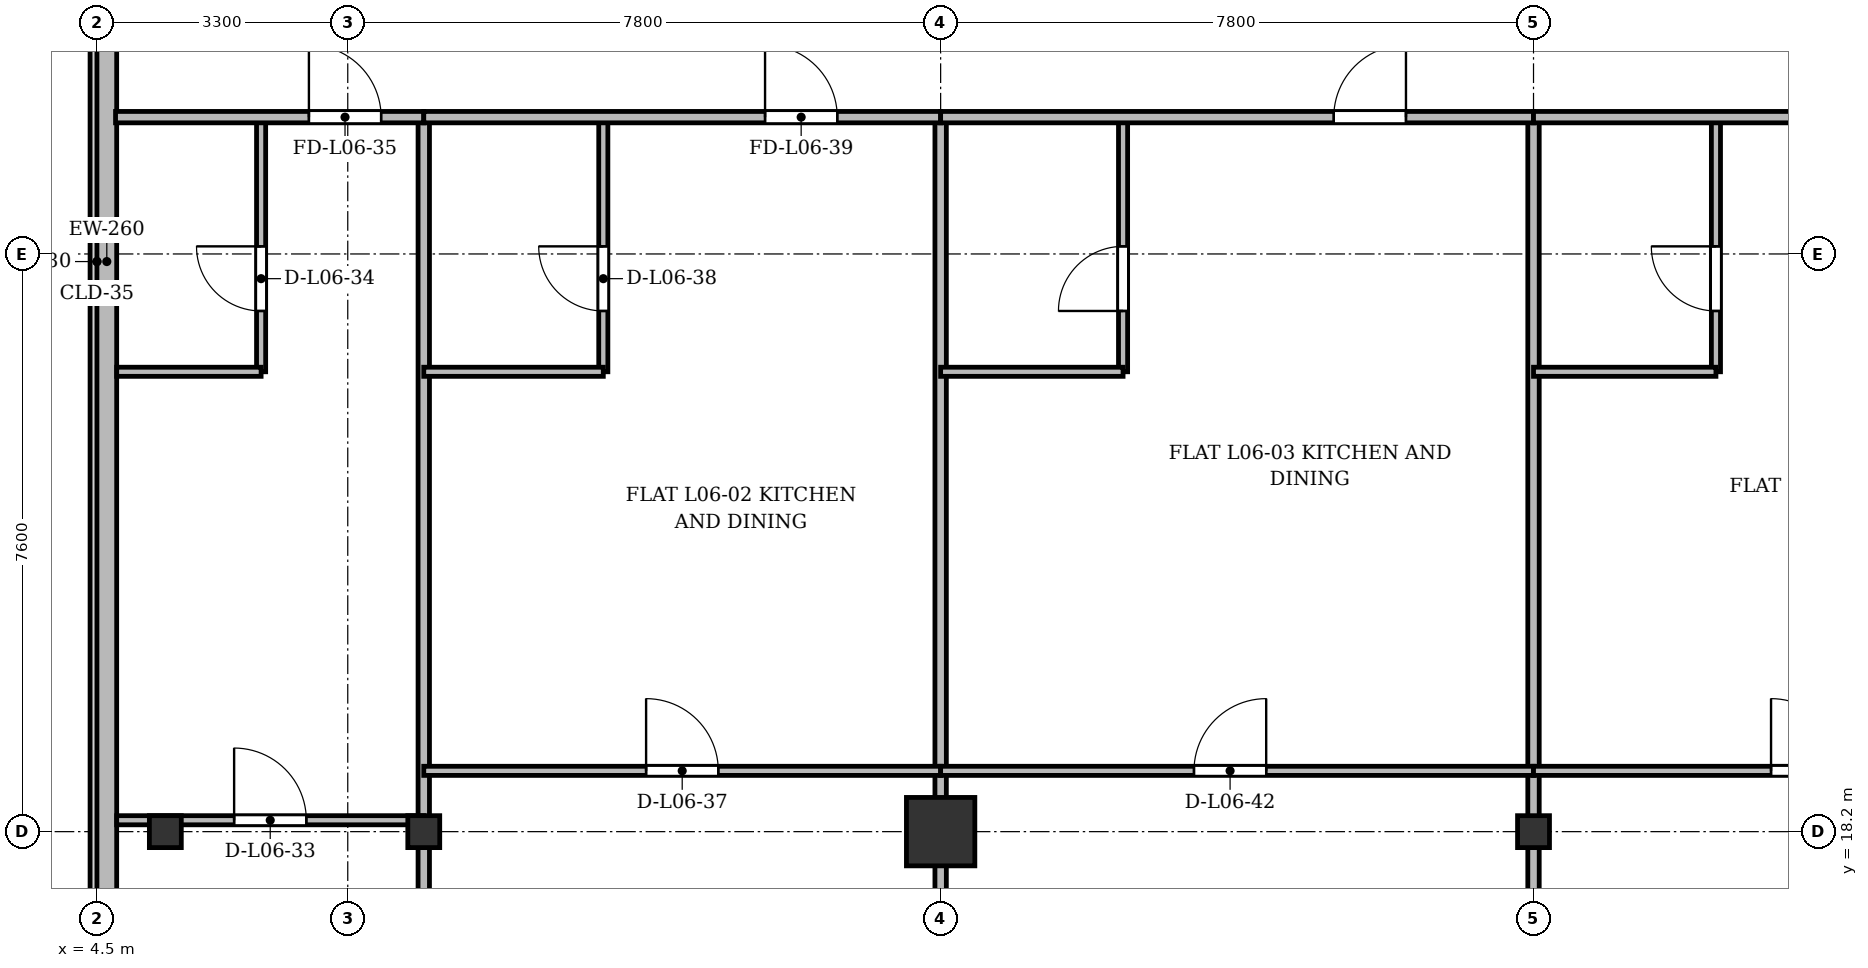
"""IFC4 building model, lengths in metres.
Left out: names, types, materials, properties, quantities, classifications, styles, units other than length and angle.
Written with IfcOpenShell. Run it as: python <this file> out.ifc"""

import sys

from ifc_helpers import new_model, si_unit, direction, frame, frame_2d, origin, origin_2d, place, context, subcontext, project, spatial, rectangle, i_section, extrude, source, transform, mapped, element, fill, save


model = new_model("IFC4")
c1 = context("Model", 3, precision=1e-05, world=origin(), true_north=direction((0.0, 1.0)))
c2 = subcontext(c1, "Body", "Model", "MODEL_VIEW")
j1 = project(units=[si_unit("LENGTHUNIT", "METRE"), si_unit("PLANEANGLEUNIT", "RADIAN")], contexts=[c1])
p1 = place(None, origin())
s1 = spatial("IfcSite", under=j1, at=p1, CompositionType="ELEMENT")
p2 = place(p1, origin())
s2 = spatial("IfcBuilding", under=s1, at=p2, CompositionType="ELEMENT")
p3 = place(p2, frame((0.0, 0.0, 27.1)))
s3 = spatial("IfcBuildingStorey", under=s2, at=p3, CompositionType="ELEMENT", Elevation=27.1)
m1 = source(origin(), c2, "Body", "SweptSolid", [
    extrude(i_section(OverallWidth=0.42, OverallDepth=0.42, WebThickness=0.026, FlangeThickness=0.04, at=origin_2d()), origin(), (0.0, 0.0, 1.0), 3.6),
])
for number, where, z_axis, x_axis in (
    (1, (5.4, 18.2, 0.0), (0.0, 0.0, 1.0), (1.0, 0.0, 0.0)),
    (2, (8.8, 18.2, 0.0), (0.0, 0.0, 1.0), (1.0, 0.0, 0.0)),
):
    element("IfcColumn", number, at=place(p3, frame(where, z_axis=z_axis, x_axis=x_axis)), inside=s3, PredefinedType="COLUMN", context=c2, shape_type="MappedRepresentation", body=[
        mapped(m1, transform((0.0, 0.0, 0.0), x_axis=(1.0, 0.0, 0.0), y_axis=(0.0, 1.0, 0.0), z_axis=(0.0, 0.0, 1.0), scale=1.0)),
    ])
m2 = source(origin(), c2, "Body", "SweptSolid", [
    extrude(rectangle(XDim=0.9, YDim=0.9, at=origin_2d()), origin(), (0.0, 0.0, 1.0), 3.6),
])
p4 = place(p3, frame((15.6, 18.2, 0.0), z_axis=(0.0, 0.0, 1.0), x_axis=(1.0, 0.0, 0.0)))
e3 = element("IfcColumn", 3, at=p4, inside=s3, PredefinedType="COLUMN", context=c2, shape_type="MappedRepresentation", body=[
    mapped(m2, transform((0.0, 0.0, 0.0), x_axis=(1.0, 0.0, 0.0), y_axis=(0.0, 1.0, 0.0), z_axis=(0.0, 0.0, 1.0), scale=1.0)),
])
p5 = place(p3, frame((23.4, 18.2, 0.0), z_axis=(0.0, 0.0, 1.0), x_axis=(1.0, 0.0, 0.0)))
e4 = element("IfcColumn", 4, at=p5, inside=s3, PredefinedType="COLUMN", context=c2, shape_type="MappedRepresentation", body=[
    mapped(m1, transform((0.0, 0.0, 0.0), x_axis=(1.0, 0.0, 0.0), y_axis=(0.0, 1.0, 0.0), z_axis=(0.0, 0.0, 1.0), scale=1.0)),
])
p6 = place(p3, frame((4.63, 5.9, 0.0), z_axis=(0.0, 0.0, 1.0), x_axis=(0.0, 1.0, 0.0)))
e5 = element("IfcWall", 5, at=p6, inside=s3, PredefinedType="SOLIDWALL", context=c2, shape_type="SweptSolid", body=[
    extrude(rectangle(XDim=39.6, YDim=0.26, at=frame_2d((19.8, 0.0))), origin(), (0.0, 0.0, 1.0), 3.34),
])
p7 = place(p6, frame((1.45, 0.0, 0.92)))
e6 = element("IfcOpeningElement", 6, at=p7, cuts=e5, PredefinedType="OPENING", context=c2, shape_type="SweptSolid", body=[
    extrude(rectangle(XDim=1.2, YDim=1.65, at=frame_2d((0.6, 0.825))), frame((0.0, 0.14, 0.0), z_axis=(0.0, -1.0, 0.0), x_axis=(1.0, 0.0, 0.0)), (0.0, 0.0, 1.0), 0.28),
])
p8 = place(p6, frame((4.2, 0.0, 0.92)))
e7 = element("IfcOpeningElement", 7, at=p8, cuts=e5, PredefinedType="OPENING", context=c2, shape_type="SweptSolid", body=[
    extrude(rectangle(XDim=2.6, YDim=1.9, at=frame_2d((1.3, 0.95))), frame((0.0, 0.14, 0.0), z_axis=(0.0, -1.0, 0.0), x_axis=(1.0, 0.0, 0.0)), (0.0, 0.0, 1.0), 0.28),
])
p9 = place(p6, frame((8.4, 0.0, 0.92)))
e8 = element("IfcOpeningElement", 8, at=p9, cuts=e5, PredefinedType="OPENING", context=c2, shape_type="SweptSolid", body=[
    extrude(rectangle(XDim=2.6, YDim=1.9, at=frame_2d((1.3, 0.95))), frame((0.0, 0.14, 0.0), z_axis=(0.0, -1.0, 0.0), x_axis=(1.0, 0.0, 0.0)), (0.0, 0.0, 1.0), 0.28),
])
p10 = place(p6, frame((33.9, 0.0, 0.92)))
e9 = element("IfcOpeningElement", 9, at=p10, cuts=e5, PredefinedType="OPENING", context=c2, shape_type="SweptSolid", body=[
    extrude(rectangle(XDim=1.2, YDim=1.65, at=frame_2d((0.6, 0.825))), frame((0.0, 0.14, 0.0), z_axis=(0.0, -1.0, 0.0), x_axis=(1.0, 0.0, 0.0)), (0.0, 0.0, 1.0), 0.28),
])
p11 = place(p6, frame((37.25, 0.0, 0.92)))
e10 = element("IfcOpeningElement", 10, at=p11, cuts=e5, PredefinedType="OPENING", context=c2, shape_type="SweptSolid", body=[
    extrude(rectangle(XDim=1.2, YDim=1.65, at=frame_2d((0.6, 0.825))), frame((0.0, 0.14, 0.0), z_axis=(0.0, -1.0, 0.0), x_axis=(1.0, 0.0, 0.0)), (0.0, 0.0, 1.0), 0.28),
])
for number, where, z_axis, x_axis in (
    (11, (8.8, 3.145, 0.0), (0.0, 0.0, 1.0), (0.0, 1.0, 0.0)),
    (12, (15.6, 3.145, 0.0), (0.0, 0.0, 1.0), (0.0, 1.0, 0.0)),
    (13, (23.4, 3.145, 0.0), (0.0, 0.0, 1.0), (0.0, 1.0, 0.0)),
):
    element("IfcWall", number, at=place(p3, frame(where, z_axis=z_axis, x_axis=x_axis)), inside=s3, PredefinedType="PARTITIONING", context=c2, shape_type="SweptSolid", body=[
        extrude(rectangle(XDim=24.455, YDim=0.15, at=frame_2d((12.228, 0.0))), origin(), (0.0, 0.0, 1.0), 2.752),
    ])
p12 = place(p3, frame((4.76, 18.35, 0.0), z_axis=(0.0, 0.0, 1.0), x_axis=(1.0, 0.0, 0.0)))
e14 = element("IfcWall", 14, at=p12, inside=s3, PredefinedType="PARTITIONING", context=c2, shape_type="SweptSolid", body=[
    extrude(rectangle(XDim=4.04, YDim=0.12, at=frame_2d((2.02, 0.0))), origin(), (0.0, 0.0, 1.0), 2.69),
])
p13 = place(p12, frame((1.545, 0.0, 0.0)))
e15 = element("IfcOpeningElement", 15, at=p13, cuts=e14, PredefinedType="OPENING", context=c2, shape_type="SweptSolid", body=[
    extrude(rectangle(XDim=0.95, YDim=2.15, at=frame_2d((0.475, 1.075))), frame((0.0, 0.07, 0.0), z_axis=(0.0, -1.0, 0.0), x_axis=(1.0, 0.0, 0.0)), (0.0, 0.0, 1.0), 0.14),
])
p14 = place(p3, frame((6.66, 24.25, 0.0), z_axis=(0.0, 0.0, 1.0), x_axis=(0.0, 1.0, 0.0)))
e16 = element("IfcWall", 16, at=p14, inside=s3, PredefinedType="PARTITIONING", context=c2, shape_type="SweptSolid", body=[
    extrude(rectangle(XDim=3.35, YDim=0.12, at=frame_2d((1.675, 0.0))), origin(), (0.0, 0.0, 1.0), 2.94),
])
p15 = place(p14, frame((0.8, 0.0, 0.0)))
e17 = element("IfcOpeningElement", 17, at=p15, cuts=e16, PredefinedType="OPENING", context=c2, shape_type="SweptSolid", body=[
    extrude(rectangle(XDim=0.85, YDim=2.1, at=frame_2d((0.425, 1.05))), frame((0.0, 0.07, 0.0), z_axis=(0.0, -1.0, 0.0), x_axis=(1.0, 0.0, 0.0)), (0.0, 0.0, 1.0), 0.14),
])
p16 = place(p3, frame((4.76, 24.25, 0.0), z_axis=(0.0, 0.0, 1.0), x_axis=(1.0, 0.0, 0.0)))
e18 = element("IfcWall", 18, at=p16, inside=s3, PredefinedType="PARTITIONING", context=c2, shape_type="SweptSolid", body=[
    extrude(rectangle(XDim=1.9, YDim=0.12, at=frame_2d((0.95, 0.0))), origin(), (0.0, 0.0, 1.0), 2.752),
])
p17 = place(p3, frame((4.745, 27.6, 0.0), z_axis=(0.0, 0.0, 1.0), x_axis=(1.0, 0.0, 0.0)))
e19 = element("IfcWall", 19, at=p17, inside=s3, PredefinedType="PARTITIONING", context=c2, shape_type="SweptSolid", body=[
    extrude(rectangle(XDim=4.055, YDim=0.15, at=frame_2d((2.027, 0.0))), origin(), (0.0, 0.0, 1.0), 2.752),
])
p18 = place(p17, frame((2.544, 0.0, 0.0)))
e20 = element("IfcOpeningElement", 20, at=p18, cuts=e19, PredefinedType="OPENING", context=c2, shape_type="SweptSolid", body=[
    extrude(rectangle(XDim=0.95, YDim=2.15, at=frame_2d((0.475, 1.075))), frame((0.0, 0.085, 0.0), z_axis=(0.0, -1.0, 0.0), x_axis=(1.0, 0.0, 0.0)), (0.0, 0.0, 1.0), 0.17),
])
p19 = place(p3, frame((8.8, 19.0, 0.0), z_axis=(0.0, 0.0, 1.0), x_axis=(1.0, 0.0, 0.0)))
e21 = element("IfcWall", 21, at=p19, inside=s3, PredefinedType="PARTITIONING", context=c2, shape_type="SweptSolid", body=[
    extrude(rectangle(XDim=6.8, YDim=0.12, at=frame_2d((3.4, 0.0))), origin(), (0.0, 0.0, 1.0), 2.752),
])
p20 = place(p19, frame((2.925, 0.0, 0.0)))
e22 = element("IfcOpeningElement", 22, at=p20, cuts=e21, PredefinedType="OPENING", context=c2, shape_type="SweptSolid", body=[
    extrude(rectangle(XDim=0.95, YDim=2.15, at=frame_2d((0.475, 1.075))), frame((0.0, 0.07, 0.0), z_axis=(0.0, -1.0, 0.0), x_axis=(1.0, 0.0, 0.0)), (0.0, 0.0, 1.0), 0.14),
])
p21 = place(p3, frame((11.162, 24.25, 0.0), z_axis=(0.0, 0.0, 1.0), x_axis=(0.0, 1.0, 0.0)))
e23 = element("IfcWall", 23, at=p21, inside=s3, PredefinedType="PARTITIONING", context=c2, shape_type="SweptSolid", body=[
    extrude(rectangle(XDim=3.35, YDim=0.12, at=frame_2d((1.675, 0.0))), origin(), (0.0, 0.0, 1.0), 2.94),
])
p22 = place(p21, frame((0.8, 0.0, 0.0)))
e24 = element("IfcOpeningElement", 24, at=p22, cuts=e23, PredefinedType="OPENING", context=c2, shape_type="SweptSolid", body=[
    extrude(rectangle(XDim=0.85, YDim=2.1, at=frame_2d((0.425, 1.05))), frame((0.0, 0.07, 0.0), z_axis=(0.0, -1.0, 0.0), x_axis=(1.0, 0.0, 0.0)), (0.0, 0.0, 1.0), 0.14),
])
p23 = place(p3, frame((8.8, 24.25, 0.0), z_axis=(0.0, 0.0, 1.0), x_axis=(1.0, 0.0, 0.0)))
e25 = element("IfcWall", 25, at=p23, inside=s3, PredefinedType="PARTITIONING", context=c2, shape_type="SweptSolid", body=[
    extrude(rectangle(XDim=2.362, YDim=0.12, at=frame_2d((1.181, 0.0))), origin(), (0.0, 0.0, 1.0), 2.752),
])
p24 = place(p3, frame((8.8, 27.6, 0.0), z_axis=(0.0, 0.0, 1.0), x_axis=(1.0, 0.0, 0.0)))
e26 = element("IfcWall", 26, at=p24, inside=s3, PredefinedType="PARTITIONING", context=c2, shape_type="SweptSolid", body=[
    extrude(rectangle(XDim=6.8, YDim=0.15, at=frame_2d((3.4, 0.0))), origin(), (0.0, 0.0, 1.0), 2.752),
])
p25 = place(p24, frame((4.49, 0.0, 0.0)))
e27 = element("IfcOpeningElement", 27, at=p25, cuts=e26, PredefinedType="OPENING", context=c2, shape_type="SweptSolid", body=[
    extrude(rectangle(XDim=0.95, YDim=2.15, at=frame_2d((0.475, 1.075))), frame((0.0, 0.085, 0.0), z_axis=(0.0, -1.0, 0.0), x_axis=(1.0, 0.0, 0.0)), (0.0, 0.0, 1.0), 0.17),
])
p26 = place(p3, frame((15.6, 19.0, 0.0), z_axis=(0.0, 0.0, 1.0), x_axis=(1.0, 0.0, 0.0)))
e28 = element("IfcWall", 28, at=p26, inside=s3, PredefinedType="PARTITIONING", context=c2, shape_type="SweptSolid", body=[
    extrude(rectangle(XDim=7.8, YDim=0.12, at=frame_2d((3.9, 0.0))), origin(), (0.0, 0.0, 1.0), 2.752),
])
p27 = place(p26, frame((3.333, 0.0, 0.0)))
e29 = element("IfcOpeningElement", 29, at=p27, cuts=e28, PredefinedType="OPENING", context=c2, shape_type="SweptSolid", body=[
    extrude(rectangle(XDim=0.95, YDim=2.15, at=frame_2d((0.475, 1.075))), frame((0.0, 0.07, 0.0), z_axis=(0.0, -1.0, 0.0), x_axis=(1.0, 0.0, 0.0)), (0.0, 0.0, 1.0), 0.14),
])
p28 = place(p3, frame((18.0, 24.25, 0.0), z_axis=(0.0, 0.0, 1.0), x_axis=(0.0, 1.0, 0.0)))
e30 = element("IfcWall", 30, at=p28, inside=s3, PredefinedType="PARTITIONING", context=c2, shape_type="SweptSolid", body=[
    extrude(rectangle(XDim=3.35, YDim=0.12, at=frame_2d((1.675, 0.0))), origin(), (0.0, 0.0, 1.0), 2.94),
])
p29 = place(p28, frame((0.8, 0.0, 0.0)))
e31 = element("IfcOpeningElement", 31, at=p29, cuts=e30, PredefinedType="OPENING", context=c2, shape_type="SweptSolid", body=[
    extrude(rectangle(XDim=0.85, YDim=2.1, at=frame_2d((0.425, 1.05))), frame((0.0, 0.07, 0.0), z_axis=(0.0, -1.0, 0.0), x_axis=(1.0, 0.0, 0.0)), (0.0, 0.0, 1.0), 0.14),
])
p30 = place(p3, frame((15.6, 24.25, 0.0), z_axis=(0.0, 0.0, 1.0), x_axis=(1.0, 0.0, 0.0)))
e32 = element("IfcWall", 32, at=p30, inside=s3, PredefinedType="PARTITIONING", context=c2, shape_type="SweptSolid", body=[
    extrude(rectangle(XDim=2.4, YDim=0.12, at=frame_2d((1.2, 0.0))), origin(), (0.0, 0.0, 1.0), 2.752),
])
p31 = place(p3, frame((15.6, 27.6, 0.0), z_axis=(0.0, 0.0, 1.0), x_axis=(1.0, 0.0, 0.0)))
e33 = element("IfcWall", 33, at=p31, inside=s3, PredefinedType="PARTITIONING", context=c2, shape_type="SweptSolid", body=[
    extrude(rectangle(XDim=7.8, YDim=0.15, at=frame_2d((3.9, 0.0))), origin(), (0.0, 0.0, 1.0), 2.752),
])
p32 = place(p31, frame((5.172, 0.0, 0.0)))
e34 = element("IfcOpeningElement", 34, at=p32, cuts=e33, PredefinedType="OPENING", context=c2, shape_type="SweptSolid", body=[
    extrude(rectangle(XDim=0.95, YDim=2.15, at=frame_2d((0.475, 1.075))), frame((0.0, 0.085, 0.0), z_axis=(0.0, -1.0, 0.0), x_axis=(1.0, 0.0, 0.0)), (0.0, 0.0, 1.0), 0.17),
])
p33 = place(p3, frame((23.4, 19.0, 0.0), z_axis=(0.0, 0.0, 1.0), x_axis=(1.0, 0.0, 0.0)))
e35 = element("IfcWall", 35, at=p33, inside=s3, PredefinedType="PARTITIONING", context=c2, shape_type="SweptSolid", body=[
    extrude(rectangle(XDim=7.2, YDim=0.12, at=frame_2d((3.6, 0.0))), origin(), (0.0, 0.0, 1.0), 2.752),
])
p34 = place(p33, frame((3.125, 0.0, 0.0)))
e36 = element("IfcOpeningElement", 36, at=p34, cuts=e35, PredefinedType="OPENING", context=c2, shape_type="SweptSolid", body=[
    extrude(rectangle(XDim=0.95, YDim=2.15, at=frame_2d((0.475, 1.075))), frame((0.0, 0.07, 0.0), z_axis=(0.0, -1.0, 0.0), x_axis=(1.0, 0.0, 0.0)), (0.0, 0.0, 1.0), 0.14),
])
p35 = place(p3, frame((25.8, 24.25, 0.0), z_axis=(0.0, 0.0, 1.0), x_axis=(0.0, 1.0, 0.0)))
e37 = element("IfcWall", 37, at=p35, inside=s3, PredefinedType="PARTITIONING", context=c2, shape_type="SweptSolid", body=[
    extrude(rectangle(XDim=3.35, YDim=0.12, at=frame_2d((1.675, 0.0))), origin(), (0.0, 0.0, 1.0), 2.94),
])
p36 = place(p35, frame((0.8, 0.0, 0.0)))
e38 = element("IfcOpeningElement", 38, at=p36, cuts=e37, PredefinedType="OPENING", context=c2, shape_type="SweptSolid", body=[
    extrude(rectangle(XDim=0.85, YDim=2.1, at=frame_2d((0.425, 1.05))), frame((0.0, 0.07, 0.0), z_axis=(0.0, -1.0, 0.0), x_axis=(1.0, 0.0, 0.0)), (0.0, 0.0, 1.0), 0.14),
])
p37 = place(p3, frame((23.4, 24.25, 0.0), z_axis=(0.0, 0.0, 1.0), x_axis=(1.0, 0.0, 0.0)))
e39 = element("IfcWall", 39, at=p37, inside=s3, PredefinedType="PARTITIONING", context=c2, shape_type="SweptSolid", body=[
    extrude(rectangle(XDim=2.4, YDim=0.12, at=frame_2d((1.2, 0.0))), origin(), (0.0, 0.0, 1.0), 2.752),
])
p38 = place(p3, frame((23.4, 27.6, 0.0), z_axis=(0.0, 0.0, 1.0), x_axis=(1.0, 0.0, 0.0)))
e40 = element("IfcWall", 40, at=p38, inside=s3, PredefinedType="PARTITIONING", context=c2, shape_type="SweptSolid", body=[
    extrude(rectangle(XDim=7.2, YDim=0.15, at=frame_2d((3.6, 0.0))), origin(), (0.0, 0.0, 1.0), 2.752),
])
p39 = place(p38, frame((4.706, 0.0, 0.0)))
e41 = element("IfcOpeningElement", 41, at=p39, cuts=e40, PredefinedType="OPENING", context=c2, shape_type="SweptSolid", body=[
    extrude(rectangle(XDim=0.95, YDim=2.15, at=frame_2d((0.475, 1.075))), frame((0.0, 0.085, 0.0), z_axis=(0.0, -1.0, 0.0), x_axis=(1.0, 0.0, 0.0)), (0.0, 0.0, 1.0), 0.17),
])
m3 = source(origin(), c2, "Body", "SweptSolid", [
    extrude(rectangle(XDim=0.95, YDim=2.15, at=frame_2d((0.475, 1.075))), frame((0.0, 0.025, 0.0), z_axis=(0.0, -1.0, 0.0), x_axis=(1.0, 0.0, 0.0)), (0.0, 0.0, 1.0), 0.05),
])
p40 = place(p13, origin())
e42 = element("IfcDoor", 42, at=p40, inside=s3, OperationType="SINGLE_SWING_LEFT", PredefinedType="DOOR", context=c2, shape_type="MappedRepresentation", body=[
    mapped(m3, transform((0.0, 0.0, 0.0), x_axis=(1.0, 0.0, 0.0), y_axis=(0.0, 1.0, 0.0), z_axis=(0.0, 0.0, 1.0), scale=1.0)),
])
fill(e15, e42)
m4 = source(origin(), c2, "Body", "SweptSolid", [
    extrude(rectangle(XDim=0.85, YDim=2.1, at=frame_2d((0.425, 1.05))), frame((0.0, 0.025, 0.0), z_axis=(0.0, -1.0, 0.0), x_axis=(1.0, 0.0, 0.0)), (0.0, 0.0, 1.0), 0.05),
])
p41 = place(p15, origin())
e43 = element("IfcDoor", 43, at=p41, inside=s3, OperationType="SINGLE_SWING_RIGHT", PredefinedType="DOOR", context=c2, shape_type="MappedRepresentation", body=[
    mapped(m4, transform((0.0, 0.0, 0.0), x_axis=(1.0, 0.0, 0.0), y_axis=(0.0, 1.0, 0.0), z_axis=(0.0, 0.0, 1.0), scale=1.0)),
])
fill(e17, e43)
p42 = place(p18, origin())
e44 = element("IfcDoor", 44, at=p42, inside=s3, OperationType="SINGLE_SWING_LEFT", PredefinedType="DOOR", context=c2, shape_type="MappedRepresentation", body=[
    mapped(m3, transform((0.0, 0.0, 0.0), x_axis=(1.0, 0.0, 0.0), y_axis=(0.0, 1.0, 0.0), z_axis=(0.0, 0.0, 1.0), scale=1.0)),
])
fill(e20, e44)
p43 = place(p20, origin())
e45 = element("IfcDoor", 45, at=p43, inside=s3, OperationType="SINGLE_SWING_LEFT", PredefinedType="DOOR", context=c2, shape_type="MappedRepresentation", body=[
    mapped(m3, transform((0.0, 0.0, 0.0), x_axis=(1.0, 0.0, 0.0), y_axis=(0.0, 1.0, 0.0), z_axis=(0.0, 0.0, 1.0), scale=1.0)),
])
fill(e22, e45)
p44 = place(p22, origin())
e46 = element("IfcDoor", 46, at=p44, inside=s3, OperationType="SINGLE_SWING_RIGHT", PredefinedType="DOOR", context=c2, shape_type="MappedRepresentation", body=[
    mapped(m4, transform((0.0, 0.0, 0.0), x_axis=(1.0, 0.0, 0.0), y_axis=(0.0, 1.0, 0.0), z_axis=(0.0, 0.0, 1.0), scale=1.0)),
])
fill(e24, e46)
p45 = place(p25, origin())
e47 = element("IfcDoor", 47, at=p45, inside=s3, OperationType="SINGLE_SWING_LEFT", PredefinedType="DOOR", context=c2, shape_type="MappedRepresentation", body=[
    mapped(m3, transform((0.0, 0.0, 0.0), x_axis=(1.0, 0.0, 0.0), y_axis=(0.0, 1.0, 0.0), z_axis=(0.0, 0.0, 1.0), scale=1.0)),
])
fill(e27, e47)
p46 = place(p27, origin())
e48 = element("IfcDoor", 48, at=p46, inside=s3, OperationType="SINGLE_SWING_RIGHT", PredefinedType="DOOR", context=c2, shape_type="MappedRepresentation", body=[
    mapped(m3, transform((0.0, 0.0, 0.0), x_axis=(1.0, 0.0, 0.0), y_axis=(0.0, 1.0, 0.0), z_axis=(0.0, 0.0, 1.0), scale=1.0)),
])
fill(e29, e48)
p47 = place(p29, origin())
e49 = element("IfcDoor", 49, at=p47, inside=s3, OperationType="SINGLE_SWING_LEFT", PredefinedType="DOOR", context=c2, shape_type="MappedRepresentation", body=[
    mapped(m4, transform((0.0, 0.0, 0.0), x_axis=(1.0, 0.0, 0.0), y_axis=(0.0, 1.0, 0.0), z_axis=(0.0, 0.0, 1.0), scale=1.0)),
])
fill(e31, e49)
p48 = place(p32, origin())
e50 = element("IfcDoor", 50, at=p48, inside=s3, OperationType="SINGLE_SWING_RIGHT", PredefinedType="DOOR", context=c2, shape_type="MappedRepresentation", body=[
    mapped(m3, transform((0.0, 0.0, 0.0), x_axis=(1.0, 0.0, 0.0), y_axis=(0.0, 1.0, 0.0), z_axis=(0.0, 0.0, 1.0), scale=1.0)),
])
fill(e34, e50)
p49 = place(p34, origin())
e51 = element("IfcDoor", 51, at=p49, inside=s3, OperationType="SINGLE_SWING_LEFT", PredefinedType="DOOR", context=c2, shape_type="MappedRepresentation", body=[
    mapped(m3, transform((0.0, 0.0, 0.0), x_axis=(1.0, 0.0, 0.0), y_axis=(0.0, 1.0, 0.0), z_axis=(0.0, 0.0, 1.0), scale=1.0)),
])
fill(e36, e51)
p50 = place(p36, origin())
e52 = element("IfcDoor", 52, at=p50, inside=s3, OperationType="SINGLE_SWING_RIGHT", PredefinedType="DOOR", context=c2, shape_type="MappedRepresentation", body=[
    mapped(m4, transform((0.0, 0.0, 0.0), x_axis=(1.0, 0.0, 0.0), y_axis=(0.0, 1.0, 0.0), z_axis=(0.0, 0.0, 1.0), scale=1.0)),
])
fill(e38, e52)
save(model, sys.argv[1])
